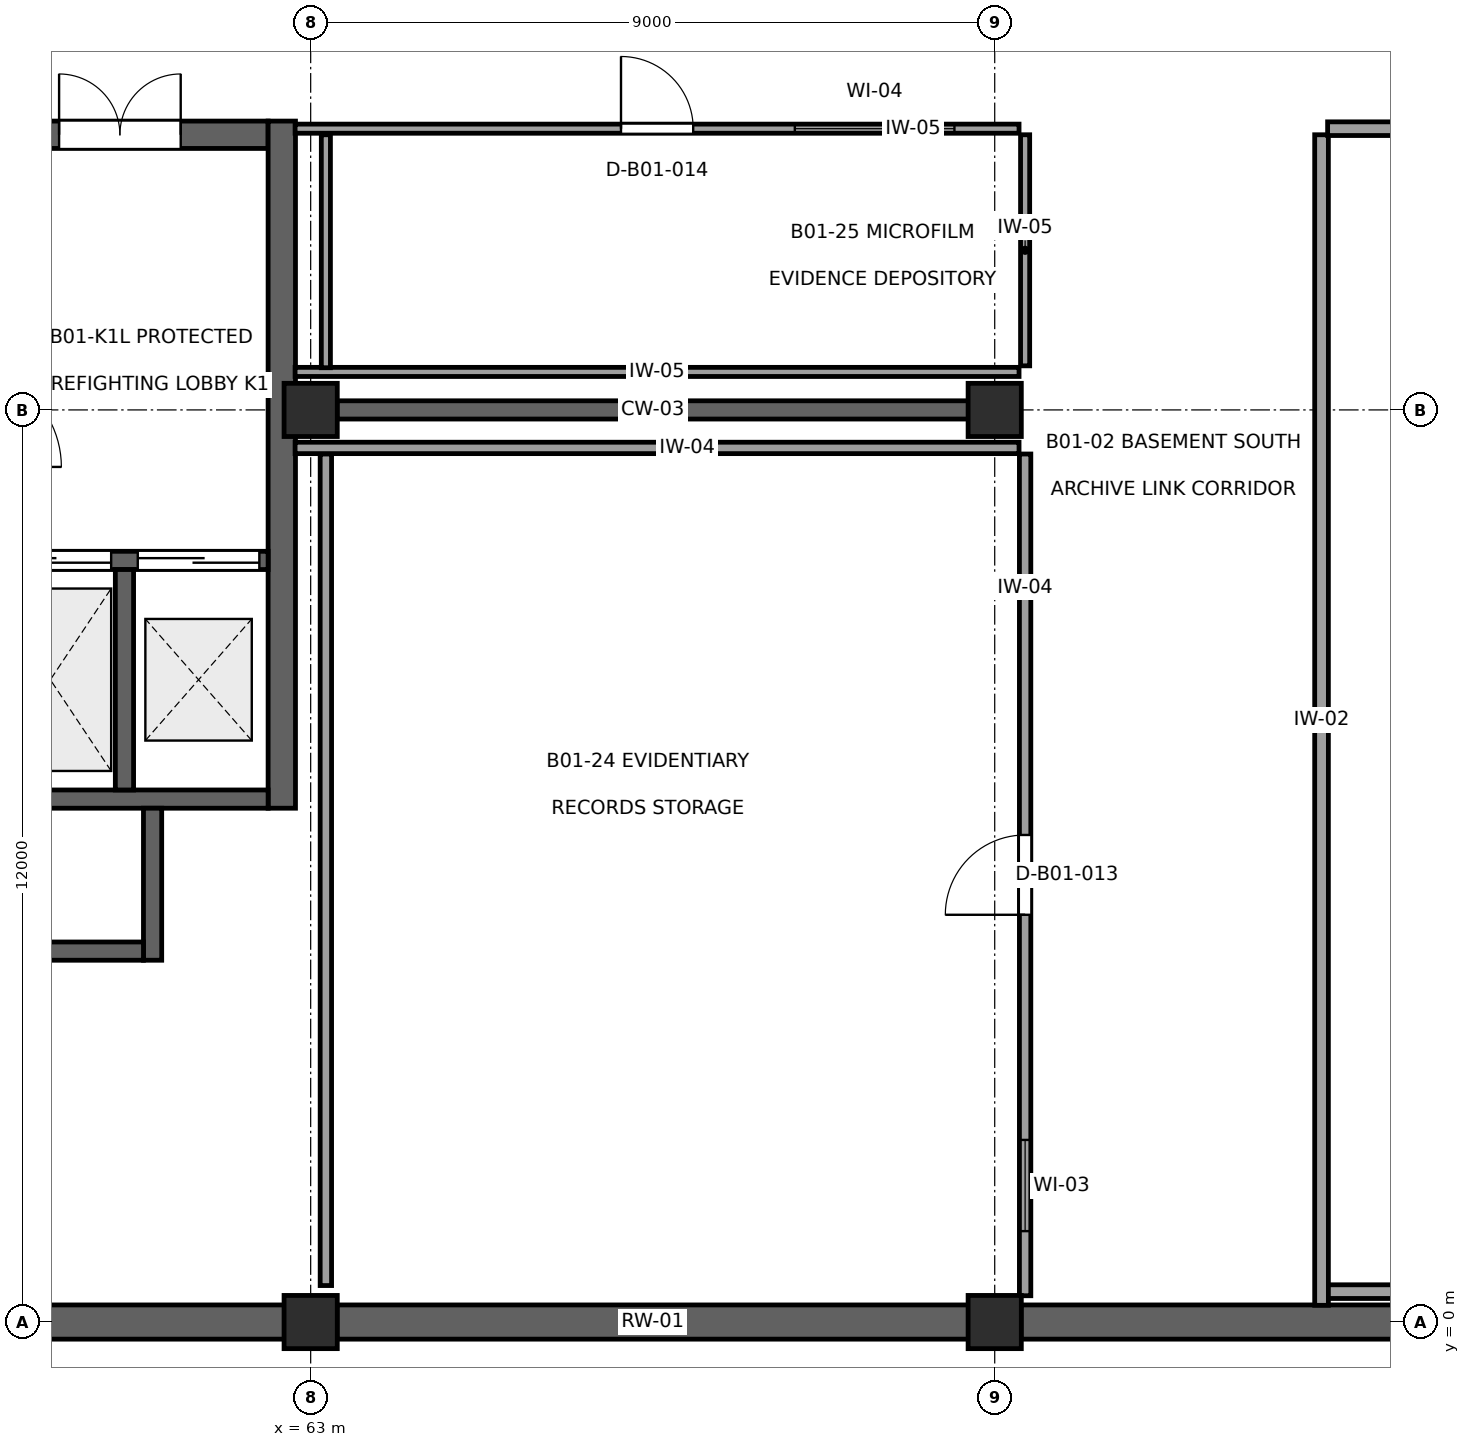
"""IFC4 building model, lengths in metres.
Left out: names, types, materials, properties, quantities, classifications, styles, units other than length and angle.
Written with IfcOpenShell. Run it as: python <this file> out.ifc"""

import sys

from ifc_helpers import new_model, si_unit, direction, frame, frame_2d, origin, origin_2d, place, context, subcontext, project, spatial, rectangle, extrude, element, fill, save


model = new_model("IFC4")
c1 = context("Model", 3, precision=1e-05, world=origin(), true_north=direction((0.0, 1.0)))
c2 = subcontext(c1, "Body", "Model", "MODEL_VIEW")
j1 = project(units=[si_unit("LENGTHUNIT", "METRE"), si_unit("PLANEANGLEUNIT", "RADIAN")], contexts=[c1])
p1 = place(None, origin())
s1 = spatial("IfcSite", under=j1, at=p1, CompositionType="ELEMENT")
p2 = place(p1, origin())
s2 = spatial("IfcBuilding", under=s1, at=p2, CompositionType="ELEMENT")
p3 = place(p2, frame((0.0, 0.0, -4.5)))
s3 = spatial("IfcBuildingStorey", under=s2, at=p3, CompositionType="ELEMENT", Elevation=-4.5)
for number, where, z_axis, x_axis in (
    (1, (63.0, 0.0, 0.0), (0.0, 0.0, 1.0), (1.0, 0.0, 0.0)),
    (2, (63.0, 12.0, 0.0), (0.0, 0.0, 1.0), (1.0, 0.0, 0.0)),
    (3, (72.0, 0.0, 0.0), (0.0, 0.0, 1.0), (1.0, 0.0, 0.0)),
    (4, (72.0, 12.0, 0.0), (0.0, 0.0, 1.0), (1.0, 0.0, 0.0)),
):
    element("IfcColumn", number, at=place(p3, frame(where, z_axis=z_axis, x_axis=x_axis)), inside=s3, PredefinedType="COLUMN", context=c2, shape_type="SweptSolid", body=[
        extrude(rectangle(XDim=0.7, YDim=0.7, at=origin_2d()), origin(), (0.0, 0.0, 1.0), 4.5),
    ])
for number, where, z_axis, x_axis in (
    (5, (54.346, 0.0, 0.0), (0.0, 0.0, 1.0), (1.0, 0.0, 0.0)),
    (6, (63.346, 0.0, 0.0), (0.0, 0.0, 1.0), (1.0, 0.0, 0.0)),
):
    element("IfcWall", number, at=place(p3, frame(where, z_axis=z_axis, x_axis=x_axis)), inside=s3, PredefinedType="USERDEFINED", context=c2, shape_type="SweptSolid", body=[
        extrude(rectangle(XDim=8.308, YDim=0.45, at=frame_2d((4.154, 0.0))), origin(), (0.0, 0.0, 1.0), 4.32),
    ])
p4 = place(p3, frame((72.346, 0.0, 0.0), z_axis=(0.0, 0.0, 1.0), x_axis=(1.0, 0.0, 0.0)))
e7 = element("IfcWall", 7, at=p4, inside=s3, PredefinedType="USERDEFINED", context=c2, shape_type="SweptSolid", body=[
    extrude(rectangle(XDim=8.258, YDim=0.45, at=frame_2d((4.129, 0.0))), origin(), (0.0, 0.0, 1.0), 4.32),
])
p5 = place(p3, frame((58.54, 15.62, 0.0), z_axis=(0.0, 0.0, 1.0), x_axis=(1.0, 0.0, 0.0)))
e8 = element("IfcWall", 8, at=p5, inside=s3, PredefinedType="SHEAR", context=c2, shape_type="SweptSolid", body=[
    extrude(rectangle(XDim=3.9, YDim=0.36, at=frame_2d((1.95, 0.0))), origin(), (0.0, 0.0, 1.0), 4.16),
])
p6 = place(p5, frame((1.15, 0.0, 0.0)))
e9 = element("IfcOpeningElement", 9, at=p6, cuts=e8, PredefinedType="OPENING", context=c2, shape_type="SweptSolid", body=[
    extrude(rectangle(XDim=1.6, YDim=2.25, at=frame_2d((0.8, 1.125))), frame((0.0, 0.195, 0.0), z_axis=(0.0, -1.0, 0.0), x_axis=(1.0, 0.0, 0.0)), (0.0, 0.0, 1.0), 0.39),
])
p7 = place(p3, frame((62.62, 6.76, 0.0), z_axis=(0.0, 0.0, 1.0), x_axis=(0.0, 1.0, 0.0)))
e10 = element("IfcWall", 10, at=p7, inside=s3, PredefinedType="SHEAR", context=c2, shape_type="SweptSolid", body=[
    extrude(rectangle(XDim=9.04, YDim=0.36, at=frame_2d((4.52, 0.0))), origin(), (0.0, 0.0, 1.0), 4.16),
])
p8 = place(p3, frame((58.54, 10.02, 0.0), z_axis=(0.0, 0.0, 1.0), x_axis=(1.0, 0.0, 0.0)))
e11 = element("IfcWall", 11, at=p8, inside=s3, PredefinedType="SHEAR", context=c2, shape_type="SweptSolid", body=[
    extrude(rectangle(XDim=3.9, YDim=0.24, at=frame_2d((1.95, 0.0))), origin(), (0.0, 0.0, 1.0), 4.31),
])
p9 = place(p8, frame((0.235, 0.0, 0.0)))
e12 = element("IfcOpeningElement", 12, at=p9, cuts=e11, PredefinedType="OPENING", context=c2, shape_type="SweptSolid", body=[
    extrude(rectangle(XDim=1.6, YDim=2.3, at=frame_2d((0.8, 1.15))), frame((0.0, 0.135, 0.0), z_axis=(0.0, -1.0, 0.0), x_axis=(1.0, 0.0, 0.0)), (0.0, 0.0, 1.0), 0.27),
])
p10 = place(p8, frame((2.185, 0.0, 0.0)))
e13 = element("IfcOpeningElement", 13, at=p10, cuts=e11, PredefinedType="OPENING", context=c2, shape_type="SweptSolid", body=[
    extrude(rectangle(XDim=1.6, YDim=2.3, at=frame_2d((0.8, 1.15))), frame((0.0, 0.135, 0.0), z_axis=(0.0, -1.0, 0.0), x_axis=(1.0, 0.0, 0.0)), (0.0, 0.0, 1.0), 0.27),
])
p11 = place(p3, frame((58.54, 6.88, 0.0), z_axis=(0.0, 0.0, 1.0), x_axis=(1.0, 0.0, 0.0)))
e14 = element("IfcWall", 14, at=p11, inside=s3, PredefinedType="SHEAR", context=c2, shape_type="SweptSolid", body=[
    extrude(rectangle(XDim=3.9, YDim=0.24, at=frame_2d((1.95, 0.0))), origin(), (0.0, 0.0, 1.0), 4.31),
])
p12 = place(p3, frame((60.55, 7.0, 0.0), z_axis=(0.0, 0.0, 1.0), x_axis=(0.0, 1.0, 0.0)))
e15 = element("IfcWall", 15, at=p12, inside=s3, PredefinedType="SHEAR", context=c2, shape_type="SweptSolid", body=[
    extrude(rectangle(XDim=2.9, YDim=0.24, at=frame_2d((1.45, 0.0))), origin(), (0.0, 0.0, 1.0), 4.31),
])
p13 = place(p3, frame((60.92, 4.76, 0.0), z_axis=(0.0, 0.0, 1.0), x_axis=(0.0, 1.0, 0.0)))
e16 = element("IfcWall", 16, at=p13, inside=s3, PredefinedType="SHEAR", context=c2, shape_type="SweptSolid", body=[
    extrude(rectangle(XDim=2.0, YDim=0.24, at=frame_2d((1.0, 0.0))), origin(), (0.0, 0.0, 1.0), 4.31),
])
p14 = place(p3, frame((58.54, 4.88, 0.0), z_axis=(0.0, 0.0, 1.0), x_axis=(1.0, 0.0, 0.0)))
e17 = element("IfcWall", 17, at=p14, inside=s3, PredefinedType="SHEAR", context=c2, shape_type="SweptSolid", body=[
    extrude(rectangle(XDim=2.26, YDim=0.24, at=frame_2d((1.13, 0.0))), origin(), (0.0, 0.0, 1.0), 4.31),
])
p15 = place(p3, frame((63.346, 12.0, 0.0), z_axis=(0.0, 0.0, 1.0), x_axis=(1.0, 0.0, 0.0)))
e18 = element("IfcWall", 18, at=p15, inside=s3, PredefinedType="SHEAR", context=c2, shape_type="SweptSolid", body=[
    extrude(rectangle(XDim=8.308, YDim=0.24, at=frame_2d((4.154, 0.0))), origin(), (0.0, 0.0, 1.0), 3.685),
])
p16 = place(p3, frame((63.2, 0.48, 0.0), z_axis=(0.0, 0.0, 1.0), x_axis=(0.0, 1.0, 0.0)))
e19 = element("IfcWall", 19, at=p16, inside=s3, PredefinedType="PARTITIONING", context=c2, shape_type="SweptSolid", body=[
    extrude(rectangle(XDim=10.94, YDim=0.15, at=frame_2d((5.47, 0.0))), origin(), (0.0, 0.0, 1.0), 3.785),
])
p17 = place(p3, frame((62.795, 11.5, 0.0), z_axis=(0.0, 0.0, 1.0), x_axis=(1.0, 0.0, 0.0)))
e20 = element("IfcWall", 20, at=p17, inside=s3, PredefinedType="PARTITIONING", context=c2, shape_type="SweptSolid", body=[
    extrude(rectangle(XDim=9.525, YDim=0.15, at=frame_2d((4.763, 0.0))), origin(), (0.0, 0.0, 1.0), 4.14),
])
p18 = place(p3, frame((72.4, 11.42, 0.0), z_axis=(0.0, 0.0, 1.0), x_axis=(0.0, -1.0, 0.0)))
e21 = element("IfcWall", 21, at=p18, inside=s3, PredefinedType="PARTITIONING", context=c2, shape_type="SweptSolid", body=[
    extrude(rectangle(XDim=11.074, YDim=0.15, at=frame_2d((5.537, 0.0))), origin(), (0.0, 0.0, 1.0), 4.14),
])
p19 = place(p18, frame((5.012, 0.0, 0.0)))
e22 = element("IfcOpeningElement", 22, at=p19, cuts=e21, PredefinedType="OPENING", context=c2, shape_type="SweptSolid", body=[
    extrude(rectangle(XDim=1.05, YDim=2.25, at=frame_2d((0.525, 1.125))), frame((0.0, 0.09, 0.0), z_axis=(0.0, -1.0, 0.0), x_axis=(1.0, 0.0, 0.0)), (0.0, 0.0, 1.0), 0.18),
])
p20 = place(p18, frame((9.024, 0.0, 1.05)))
e23 = element("IfcOpeningElement", 23, at=p20, cuts=e21, PredefinedType="OPENING", context=c2, shape_type="SweptSolid", body=[
    extrude(rectangle(XDim=1.2, YDim=1.0, at=frame_2d((0.6, 0.5))), frame((0.0, 0.09, 0.0), z_axis=(0.0, -1.0, 0.0), x_axis=(1.0, 0.0, 0.0)), (0.0, 0.0, 1.0), 0.18),
])
p21 = place(p3, frame((72.4, 15.62, 0.0), z_axis=(0.0, 0.0, 1.0), x_axis=(0.0, -1.0, 0.0)))
e24 = element("IfcWall", 24, at=p21, inside=s3, PredefinedType="PARTITIONING", context=c2, shape_type="SweptSolid", body=[
    extrude(rectangle(XDim=3.04, YDim=0.12, at=frame_2d((1.52, 0.0))), origin(), (0.0, 0.0, 1.0), 4.14),
])
p22 = place(p3, frame((72.32, 12.5, 0.0), z_axis=(0.0, 0.0, 1.0), x_axis=(-1.0, 0.0, 0.0)))
e25 = element("IfcWall", 25, at=p22, inside=s3, PredefinedType="PARTITIONING", context=c2, shape_type="SweptSolid", body=[
    extrude(rectangle(XDim=9.525, YDim=0.12, at=frame_2d((4.763, 0.0))), origin(), (0.0, 0.0, 1.0), 4.14),
])
p23 = place(p3, frame((63.2, 12.555, 0.0), z_axis=(0.0, 0.0, 1.0), x_axis=(0.0, 1.0, 0.0)))
e26 = element("IfcWall", 26, at=p23, inside=s3, PredefinedType="PARTITIONING", context=c2, shape_type="SweptSolid", body=[
    extrude(rectangle(XDim=3.065, YDim=0.12, at=frame_2d((1.533, 0.0))), origin(), (0.0, 0.0, 1.0), 3.785),
])
p24 = place(p3, frame((62.795, 15.7, 0.0), z_axis=(0.0, 0.0, 1.0), x_axis=(1.0, 0.0, 0.0)))
e27 = element("IfcWall", 27, at=p24, inside=s3, PredefinedType="PARTITIONING", context=c2, shape_type="SweptSolid", body=[
    extrude(rectangle(XDim=9.525, YDim=0.12, at=frame_2d((4.763, 0.0))), origin(), (0.0, 0.0, 1.0), 4.14),
])
p25 = place(p24, frame((4.288, 0.0, 0.0)))
e28 = element("IfcOpeningElement", 28, at=p25, cuts=e27, PredefinedType="OPENING", context=c2, shape_type="SweptSolid", body=[
    extrude(rectangle(XDim=0.95, YDim=2.15, at=frame_2d((0.475, 1.075))), frame((0.0, 0.075, 0.0), z_axis=(0.0, -1.0, 0.0), x_axis=(1.0, 0.0, 0.0)), (0.0, 0.0, 1.0), 0.15),
])
p26 = place(p24, frame((6.575, 0.0, 1.05)))
e29 = element("IfcOpeningElement", 29, at=p26, cuts=e27, PredefinedType="OPENING", context=c2, shape_type="SweptSolid", body=[
    extrude(rectangle(XDim=2.1, YDim=1.2, at=frame_2d((1.05, 0.6))), frame((0.0, 0.075, 0.0), z_axis=(0.0, -1.0, 0.0), x_axis=(1.0, 0.0, 0.0)), (0.0, 0.0, 1.0), 0.15),
])
p27 = place(p3, frame((107.72, 0.4, 0.0), z_axis=(0.0, 0.0, 1.0), x_axis=(-1.0, 0.0, 0.0)))
e30 = element("IfcWall", 30, at=p27, inside=s3, PredefinedType="PARTITIONING", context=c2, shape_type="SweptSolid", body=[
    extrude(rectangle(XDim=31.34, YDim=0.18, at=frame_2d((15.67, 0.0))), origin(), (0.0, 0.0, 1.0), 4.14),
])
p28 = place(p3, frame((76.3, 0.22, 0.0), z_axis=(0.0, 0.0, 1.0), x_axis=(0.0, 1.0, 0.0)))
e31 = element("IfcWall", 31, at=p28, inside=s3, PredefinedType="PARTITIONING", context=c2, shape_type="SweptSolid", body=[
    extrude(rectangle(XDim=15.4, YDim=0.18, at=frame_2d((7.7, 0.0))), origin(), (0.0, 0.0, 1.0), 4.14),
])
p29 = place(p3, frame((76.38, 15.7, 0.0), z_axis=(0.0, 0.0, 1.0), x_axis=(1.0, 0.0, 0.0)))
e32 = element("IfcWall", 32, at=p29, inside=s3, PredefinedType="PARTITIONING", context=c2, shape_type="SweptSolid", body=[
    extrude(rectangle(XDim=31.34, YDim=0.18, at=frame_2d((15.67, 0.0))), origin(), (0.0, 0.0, 1.0), 4.14),
])
p30 = place(p29, frame((14.945, 0.0, 0.0)))
e33 = element("IfcOpeningElement", 33, at=p30, cuts=e32, PredefinedType="OPENING", context=c2, shape_type="SweptSolid", body=[
    extrude(rectangle(XDim=1.45, YDim=2.3, at=frame_2d((0.725, 1.15))), frame((0.0, 0.105, 0.0), z_axis=(0.0, -1.0, 0.0), x_axis=(1.0, 0.0, 0.0)), (0.0, 0.0, 1.0), 0.21),
])
p31 = place(p29, frame((28.69, 0.0, 1.05)))
e34 = element("IfcOpeningElement", 34, at=p31, cuts=e32, PredefinedType="OPENING", context=c2, shape_type="SweptSolid", body=[
    extrude(rectangle(XDim=1.8, YDim=1.1, at=frame_2d((0.9, 0.55))), frame((0.0, 0.105, 0.0), z_axis=(0.0, -1.0, 0.0), x_axis=(1.0, 0.0, 0.0)), (0.0, 0.0, 1.0), 0.21),
])
p32 = place(p6, origin())
e35 = element("IfcDoor", 35, at=p32, inside=s3, OperationType="DOUBLE_DOOR_SINGLE_SWING", PredefinedType="DOOR", context=c2, shape_type="SweptSolid", body=[
    extrude(rectangle(XDim=1.6, YDim=2.25, at=frame_2d((0.8, 1.125))), frame((0.0, 0.025, 0.0), z_axis=(0.0, -1.0, 0.0), x_axis=(1.0, 0.0, 0.0)), (0.0, 0.0, 1.0), 0.05),
])
fill(e9, e35)
p33 = place(p9, origin())
e36 = element("IfcDoor", 36, at=p33, inside=s3, OperationType="DOUBLE_DOOR_SLIDING", PredefinedType="DOOR", context=c2, shape_type="SweptSolid", body=[
    extrude(rectangle(XDim=1.6, YDim=2.3, at=frame_2d((0.8, 1.15))), frame((0.0, 0.025, 0.0), z_axis=(0.0, -1.0, 0.0), x_axis=(1.0, 0.0, 0.0)), (0.0, 0.0, 1.0), 0.05),
])
fill(e12, e36)
p34 = place(p10, origin())
e37 = element("IfcDoor", 37, at=p34, inside=s3, OperationType="DOUBLE_DOOR_SLIDING", PredefinedType="DOOR", context=c2, shape_type="SweptSolid", body=[
    extrude(rectangle(XDim=1.6, YDim=2.3, at=frame_2d((0.8, 1.15))), frame((0.0, 0.025, 0.0), z_axis=(0.0, -1.0, 0.0), x_axis=(1.0, 0.0, 0.0)), (0.0, 0.0, 1.0), 0.05),
])
fill(e13, e37)
p35 = place(p19, frame((1.05, 0.0, 0.0), z_axis=(0.0, 0.0, 1.0), x_axis=(-1.0, 0.0, 0.0)))
e38 = element("IfcDoor", 38, at=p35, inside=s3, OperationType="SINGLE_SWING_RIGHT", PredefinedType="DOOR", context=c2, shape_type="SweptSolid", body=[
    extrude(rectangle(XDim=1.05, YDim=2.25, at=frame_2d((0.525, 1.125))), frame((0.0, 0.025, 0.0), z_axis=(0.0, -1.0, 0.0), x_axis=(1.0, 0.0, 0.0)), (0.0, 0.0, 1.0), 0.05),
])
fill(e22, e38)
p36 = place(p20, origin())
e39 = element("IfcWindow", 39, at=p36, inside=s3, PartitioningType="SINGLE_PANEL", PredefinedType="WINDOW", context=c2, shape_type="SweptSolid", body=[
    extrude(rectangle(XDim=1.2, YDim=1.0, at=frame_2d((0.6, 0.5))), frame((0.0, 0.03, 0.0), z_axis=(0.0, -1.0, 0.0), x_axis=(1.0, 0.0, 0.0)), (0.0, 0.0, 1.0), 0.06),
])
fill(e23, e39)
p37 = place(p25, origin())
e40 = element("IfcDoor", 40, at=p37, inside=s3, OperationType="SINGLE_SWING_LEFT", PredefinedType="DOOR", context=c2, shape_type="SweptSolid", body=[
    extrude(rectangle(XDim=0.95, YDim=2.15, at=frame_2d((0.475, 1.075))), frame((0.0, 0.025, 0.0), z_axis=(0.0, -1.0, 0.0), x_axis=(1.0, 0.0, 0.0)), (0.0, 0.0, 1.0), 0.05),
])
fill(e28, e40)
p38 = place(p26, origin())
e41 = element("IfcWindow", 41, at=p38, inside=s3, PartitioningType="SINGLE_PANEL", PredefinedType="WINDOW", context=c2, shape_type="SweptSolid", body=[
    extrude(rectangle(XDim=2.1, YDim=1.2, at=frame_2d((1.05, 0.6))), frame((0.0, 0.03, 0.0), z_axis=(0.0, -1.0, 0.0), x_axis=(1.0, 0.0, 0.0)), (0.0, 0.0, 1.0), 0.06),
])
fill(e29, e41)
save(model, sys.argv[1])
